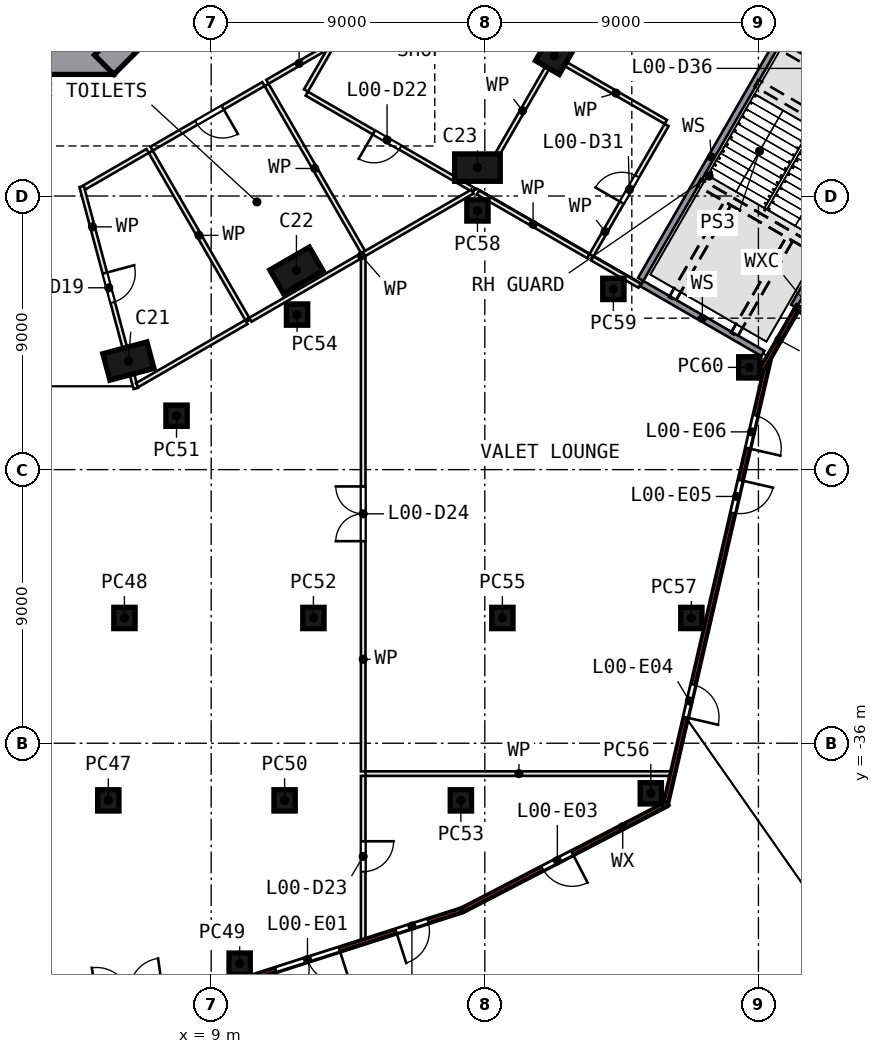
"""IFC4 building model, lengths in metres.
Left out: names, types, materials, properties, quantities, classifications, styles, units other than length and angle.
Written with IfcOpenShell. Run it as: python <this file> out.ifc"""

import sys

from ifc_helpers import new_model, si_unit, direction, frame, frame_2d, origin, origin_2d, place, context, subcontext, project, spatial, rectangle, extrude, element, fill, save


model = new_model("IFC4")
c1 = context("Model", 3, precision=1e-05, world=origin(), true_north=direction((0.0, 1.0)))
c2 = subcontext(c1, "Body", "Model", "MODEL_VIEW")
j1 = project(units=[si_unit("LENGTHUNIT", "METRE"), si_unit("PLANEANGLEUNIT", "RADIAN")], contexts=[c1])
p1 = place(None, origin())
s1 = spatial("IfcSite", under=j1, at=p1, CompositionType="ELEMENT")
p2 = place(p1, origin())
s2 = spatial("IfcBuilding", under=s1, at=p2, CompositionType="ELEMENT")
p3 = place(p2, origin())
s3 = spatial("IfcBuildingStorey", under=s2, at=p3, CompositionType="ELEMENT", Elevation=0.0)
for number, where, z_axis, x_axis in (
    (1, (6.278, -23.428, 0.0), (0.0, 0.0, 1.0), (-0.966, -0.259, 0.0)),
    (2, (11.804, -20.445, 0.0), (0.0, 0.0, 1.0), (0.866, 0.5, 0.0)),
    (3, (17.758, -17.065, 0.0), (0.0, 0.0, 1.0), (-1.0, 0.0, 0.0)),
):
    element("IfcColumn", number, at=place(p3, frame(where, z_axis=z_axis, x_axis=x_axis)), inside=s3, PredefinedType="COLUMN", context=c2, shape_type="SweptSolid", body=[
        extrude(rectangle(XDim=1.5, YDim=0.9, at=origin_2d()), origin(), (0.0, 0.0, 1.0), 7.55),
    ])
p4 = place(p3, frame((20.283, -13.385, 0.0), z_axis=(0.0, 0.0, 1.0), x_axis=(0.866025404, -0.5, 0.0)))
e4 = element("IfcColumn", 4, at=p4, inside=s3, PredefinedType="COLUMN", context=c2, shape_type="SweptSolid", body=[
    extrude(rectangle(XDim=0.9, YDim=0.9, at=origin_2d()), origin(), (0.0, 0.0, 1.0), 7.55),
])
p5 = place(p3, frame((-5.799, -13.55, 0.0), z_axis=(0.0, 0.0, 1.0), x_axis=(1.0, 0.0, 0.0)))
e5 = element("IfcWall", 5, at=p5, inside=s3, PredefinedType="SHEAR", context=c2, shape_type="SweptSolid", body=[
    extrude(rectangle(XDim=11.598, YDim=0.9, at=frame_2d((5.799, 0.0))), origin(), (0.0, 0.0, 1.0), 8.0),
])
p6 = place(p5, frame((4.899, 0.0, 0.0)))
e6 = element("IfcOpeningElement", 6, at=p6, cuts=e5, PredefinedType="OPENING", context=c2, shape_type="SweptSolid", body=[
    extrude(rectangle(XDim=1.8, YDim=2.1, at=frame_2d((0.9, 1.05))), frame((0.0, 0.46, 0.0), z_axis=(0.0, -1.0, 0.0), x_axis=(1.0, 0.0, 0.0)), (0.0, 0.0, 1.0), 0.92),
])
p7 = place(p3, frame((5.481, -13.682, 0.0), z_axis=(0.0, 0.0, 1.0), x_axis=(0.707106781, 0.707106781, 0.0)))
e7 = element("IfcWall", 7, at=p7, inside=s3, PredefinedType="SHEAR", context=c2, shape_type="SweptSolid", body=[
    extrude(rectangle(XDim=11.598, YDim=0.9, at=frame_2d((5.799, 0.0))), origin(), (0.0, 0.0, 1.0), 8.0),
])
p8 = place(p7, frame((2.099, 0.0, 0.0)))
e8 = element("IfcOpeningElement", 8, at=p8, cuts=e7, PredefinedType="OPENING", context=c2, shape_type="SweptSolid", body=[
    extrude(rectangle(XDim=1.2, YDim=2.1, at=frame_2d((0.6, 1.05))), frame((0.0, 0.46, 0.0), z_axis=(0.0, -1.0, 0.0), x_axis=(1.0, 0.0, 0.0)), (0.0, 0.0, 1.0), 0.92),
])
for number, where, z_axis, x_axis in (
    (9, (5.616, -37.88, 0.0), (0.0, 0.0, 1.0), (0.0, -1.0, 0.0)),
    (10, (6.147, -31.88, 0.0), (0.0, 0.0, 1.0), (0.0, -1.0, 0.0)),
    (11, (9.936, -43.251, 0.0), (0.0, 0.0, 1.0), (0.0, -1.0, 0.0)),
    (12, (11.415, -37.88, 0.0), (0.0, 0.0, 1.0), (0.0, -1.0, 0.0)),
    (13, (7.86, -25.227, 0.0), (0.0, 0.0, 1.0), (0.0, -1.0, 0.0)),
    (14, (12.363, -31.88, 0.0), (0.0, 0.0, 1.0), (0.0, -1.0, 0.0)),
    (15, (17.213, -37.88, 0.0), (0.0, 0.0, 1.0), (0.0, -1.0, 0.0)),
    (16, (11.825, -21.9, 0.0), (0.0, 0.0, 1.0), (0.0, -1.0, 0.0)),
    (17, (18.578, -31.88, 0.0), (0.0, 0.0, 1.0), (0.0, -1.0, 0.0)),
    (18, (23.46, -37.647, 0.0), (0.0, 0.0, 1.0), (0.0, -1.0, 0.0)),
    (19, (24.794, -31.88, 0.0), (0.0, 0.0, 1.0), (0.0, -1.0, 0.0)),
    (20, (17.758, -18.474, 0.0), (0.0, 0.0, 1.0), (0.0, -1.0, 0.0)),
    (21, (22.229, -21.055, 0.0), (0.0, 0.0, 1.0), (0.0, -1.0, 0.0)),
    (22, (26.7, -23.637, 0.0), (0.0, 0.0, 1.0), (0.0, -1.0, 0.0)),
):
    element("IfcColumn", number, at=place(p3, frame(where, z_axis=z_axis, x_axis=x_axis)), inside=s3, PredefinedType="COLUMN", context=c2, shape_type="SweptSolid", body=[
        extrude(rectangle(XDim=0.7, YDim=0.7, at=origin_2d()), origin(), (0.0, 0.0, 1.0), 8.0),
    ])
p9 = place(p3, frame((17.261, -41.482, 0.0), z_axis=(0.0, 0.0, 1.0), x_axis=(-0.952331204, -0.305066021, 0.0)))
e23 = element("IfcWall", 23, at=p9, inside=s3, PredefinedType="SOLIDWALL", context=c2, shape_type="SweptSolid", body=[
    extrude(rectangle(XDim=7.568, YDim=0.14, at=frame_2d((3.784, 0.0))), origin(), (0.0, 0.0, 1.0), 7.55),
])
p10 = place(p9, frame((4.248, 0.0, 0.0)))
e24 = element("IfcOpeningElement", 24, at=p10, cuts=e23, PredefinedType="OPENING", context=c2, shape_type="SweptSolid", body=[
    extrude(rectangle(XDim=2.2, YDim=2.4, at=frame_2d((1.1, 1.2))), frame((0.0, 0.08, 0.0), z_axis=(0.0, -1.0, 0.0), x_axis=(1.0, 0.0, 0.0)), (0.0, 0.0, 1.0), 0.16),
])
p11 = place(p9, frame((1.191, 0.0, 0.0)))
e25 = element("IfcOpeningElement", 25, at=p11, cuts=e23, PredefinedType="OPENING", context=c2, shape_type="SweptSolid", body=[
    extrude(rectangle(XDim=1.1, YDim=2.4, at=frame_2d((0.55, 1.2))), frame((0.0, 0.08, 0.0), z_axis=(0.0, -1.0, 0.0), x_axis=(1.0, 0.0, 0.0)), (0.0, 0.0, 1.0), 0.16),
])
p12 = place(p3, frame((24.021, -37.976, 0.0), z_axis=(0.0, 0.0, 1.0), x_axis=(-0.887749202, -0.460327442, 0.0)))
e26 = element("IfcWall", 26, at=p12, inside=s3, PredefinedType="SOLIDWALL", context=c2, shape_type="SweptSolid", body=[
    extrude(rectangle(XDim=7.627, YDim=0.14, at=frame_2d((3.813, 0.0))), origin(), (0.0, 0.0, 1.0), 7.55),
])
p13 = place(p12, frame((3.544, 0.0, 0.0)))
e27 = element("IfcOpeningElement", 27, at=p13, cuts=e26, PredefinedType="OPENING", context=c2, shape_type="SweptSolid", body=[
    extrude(rectangle(XDim=1.1, YDim=2.4, at=frame_2d((0.55, 1.2))), frame((0.0, 0.08, 0.0), z_axis=(0.0, -1.0, 0.0), x_axis=(1.0, 0.0, 0.0)), (0.0, 0.0, 1.0), 0.16),
])
p14 = place(p3, frame((27.288, -23.537, 0.0), z_axis=(0.0, 0.0, 1.0), x_axis=(-0.22528195, -0.974293612, 0.0)))
e28 = element("IfcWall", 28, at=p14, inside=s3, PredefinedType="SOLIDWALL", context=c2, shape_type="SweptSolid", body=[
    extrude(rectangle(XDim=14.772, YDim=0.14, at=frame_2d((7.386, 0.0))), origin(), (0.0, 0.0, 1.0), 7.55),
])
p15 = place(p14, frame((10.815, 0.0, 0.0)))
e29 = element("IfcOpeningElement", 29, at=p15, cuts=e28, PredefinedType="OPENING", context=c2, shape_type="SweptSolid", body=[
    extrude(rectangle(XDim=1.1, YDim=2.4, at=frame_2d((0.55, 1.2))), frame((0.0, 0.08, 0.0), z_axis=(0.0, -1.0, 0.0), x_axis=(1.0, 0.0, 0.0)), (0.0, 0.0, 1.0), 0.16),
])
p16 = place(p14, frame((3.91, 0.0, 0.0)))
e30 = element("IfcOpeningElement", 30, at=p16, cuts=e28, PredefinedType="OPENING", context=c2, shape_type="SweptSolid", body=[
    extrude(rectangle(XDim=1.1, YDim=2.4, at=frame_2d((0.55, 1.2))), frame((0.0, 0.08, 0.0), z_axis=(0.0, -1.0, 0.0), x_axis=(1.0, 0.0, 0.0)), (0.0, 0.0, 1.0), 0.16),
])
p17 = place(p14, frame((1.73, 0.0, 0.0)))
e31 = element("IfcOpeningElement", 31, at=p17, cuts=e28, PredefinedType="OPENING", context=c2, shape_type="SweptSolid", body=[
    extrude(rectangle(XDim=1.1, YDim=2.4, at=frame_2d((0.55, 1.2))), frame((0.0, 0.08, 0.0), z_axis=(0.0, -1.0, 0.0), x_axis=(1.0, 0.0, 0.0)), (0.0, 0.0, 1.0), 0.16),
])
p18 = place(p3, frame((27.101, -23.72, 0.0), z_axis=(0.0, 0.0, 1.0), x_axis=(0.499965247, 0.866045467, 0.0)))
e32 = element("IfcWall", 32, at=p18, inside=s3, PredefinedType="SOLIDWALL", context=c2, shape_type="SweptSolid", body=[
    extrude(rectangle(XDim=2.292, YDim=0.14, at=frame_2d((1.146, 0.0))), origin(), (0.0, 0.0, 1.0), 7.55),
])
p19 = place(p3, frame((28.221, -21.64, 0.0), z_axis=(0.0, 0.0, 1.0), x_axis=(0.866011627, -0.500023862, 0.0)))
e33 = element("IfcWall", 33, at=p19, inside=s3, PredefinedType="SOLIDWALL", context=c2, shape_type="SweptSolid", body=[
    extrude(rectangle(XDim=1.94, YDim=0.14, at=frame_2d((0.97, 0.0))), origin(), (0.0, 0.0, 1.0), 7.55),
])
p20 = place(p3, frame((4.739, -17.686, 0.0), z_axis=(0.0, 0.0, 1.0), x_axis=(0.258784572, -0.965935063, 0.0)))
e34 = element("IfcWall", 34, at=p20, inside=s3, PredefinedType="PARTITIONING", context=c2, shape_type="SweptSolid", body=[
    extrude(rectangle(XDim=6.879, YDim=0.15, at=frame_2d((3.44, 0.0))), origin(), (0.0, 0.0, 1.0), 7.55),
])
p21 = place(p20, frame((2.95, 0.0, 0.0)))
e35 = element("IfcOpeningElement", 35, at=p21, cuts=e34, PredefinedType="OPENING", context=c2, shape_type="SweptSolid", body=[
    extrude(rectangle(XDim=1.0, YDim=2.1, at=frame_2d((0.5, 1.05))), frame((0.0, 0.085, 0.0), z_axis=(0.0, -1.0, 0.0), x_axis=(1.0, 0.0, 0.0)), (0.0, 0.0, 1.0), 0.17),
])
p22 = place(p3, frame((6.565, -24.221, 0.0), z_axis=(0.0, 0.0, 1.0), x_axis=(0.866044525, 0.49996688, 0.0)))
e36 = element("IfcWall", 36, at=p22, inside=s3, PredefinedType="PARTITIONING", context=c2, shape_type="SweptSolid", body=[
    extrude(rectangle(XDim=4.15, YDim=0.15, at=frame_2d((2.075, 0.0))), origin(), (0.0, 0.0, 1.0), 7.55),
])
p23 = place(p3, frame((6.909, -16.517, 0.0), z_axis=(0.0, 0.0, 1.0), x_axis=(-0.866064057, -0.499933044, 0.0)))
e37 = element("IfcWall", 37, at=p23, inside=s3, PredefinedType="PARTITIONING", context=c2, shape_type="SweptSolid", body=[
    extrude(rectangle(XDim=2.408, YDim=0.15, at=frame_2d((1.204, 0.0))), origin(), (0.0, 0.0, 1.0), 7.55),
])
p24 = place(p3, frame((10.186, -22.043, 0.0), z_axis=(0.0, 0.0, 1.0), x_axis=(-0.499976504, 0.866038969, 0.0)))
e38 = element("IfcWall", 38, at=p24, inside=s3, PredefinedType="PARTITIONING", context=c2, shape_type="SweptSolid", body=[
    extrude(rectangle(XDim=6.35, YDim=0.15, at=frame_2d((3.175, 0.0))), origin(), (0.0, 0.0, 1.0), 7.55),
])
p25 = place(p3, frame((10.719, -14.317, 0.0), z_axis=(0.0, 0.0, 1.0), x_axis=(-0.866003829, -0.500037366, 0.0)))
e39 = element("IfcWall", 39, at=p25, inside=s3, PredefinedType="PARTITIONING", context=c2, shape_type="SweptSolid", body=[
    extrude(rectangle(XDim=4.25, YDim=0.15, at=frame_2d((2.125, 0.0))), origin(), (0.0, 0.0, 1.0), 7.55),
])
p26 = place(p25, frame((1.55, 0.0, 0.0)))
e40 = element("IfcOpeningElement", 40, at=p26, cuts=e39, PredefinedType="OPENING", context=c2, shape_type="SweptSolid", body=[
    extrude(rectangle(XDim=1.0, YDim=2.1, at=frame_2d((0.5, 1.05))), frame((0.0, 0.085, 0.0), z_axis=(0.0, -1.0, 0.0), x_axis=(1.0, 0.0, 0.0)), (0.0, 0.0, 1.0), 0.17),
])
p27 = place(p3, frame((17.643, -17.807, 0.0), z_axis=(0.0, 0.0, 1.0), x_axis=(-0.866029357, 0.499993152, 0.0)))
e41 = element("IfcWall", 41, at=p27, inside=s3, PredefinedType="PARTITIONING", context=c2, shape_type="SweptSolid", body=[
    extrude(rectangle(XDim=6.35, YDim=0.15, at=frame_2d((3.175, 0.0))), origin(), (0.0, 0.0, 1.0), 7.55),
])
p28 = place(p27, frame((2.8, 0.0, 0.0)))
e42 = element("IfcOpeningElement", 42, at=p28, cuts=e41, PredefinedType="OPENING", context=c2, shape_type="SweptSolid", body=[
    extrude(rectangle(XDim=1.0, YDim=2.1, at=frame_2d((0.5, 1.05))), frame((0.0, 0.085, 0.0), z_axis=(0.0, -1.0, 0.0), x_axis=(1.0, 0.0, 0.0)), (0.0, 0.0, 1.0), 0.17),
])
p29 = place(p3, frame((12.935, -13.038, 0.0), z_axis=(0.0, 0.0, 1.0), x_axis=(-0.866064057, -0.499933044, 0.0)))
e43 = element("IfcWall", 43, at=p29, inside=s3, PredefinedType="PARTITIONING", context=c2, shape_type="SweptSolid", body=[
    extrude(rectangle(XDim=2.408, YDim=0.15, at=frame_2d((1.204, 0.0))), origin(), (0.0, 0.0, 1.0), 7.55),
])
p30 = place(p3, frame((14.0, -37.075, 0.0), z_axis=(0.0, 0.0, 1.0), x_axis=(0.0, -1.0, 0.0)))
e44 = element("IfcWall", 44, at=p30, inside=s3, PredefinedType="PARTITIONING", context=c2, shape_type="SweptSolid", body=[
    extrude(rectangle(XDim=5.44, YDim=0.15, at=frame_2d((2.72, 0.0))), origin(), (0.0, 0.0, 1.0), 7.55),
])
p31 = place(p30, frame((2.15, 0.0, 0.0)))
e45 = element("IfcOpeningElement", 45, at=p31, cuts=e44, PredefinedType="OPENING", context=c2, shape_type="SweptSolid", body=[
    extrude(rectangle(XDim=1.0, YDim=2.1, at=frame_2d((0.5, 1.05))), frame((0.0, 0.085, 0.0), z_axis=(0.0, -1.0, 0.0), x_axis=(1.0, 0.0, 0.0)), (0.0, 0.0, 1.0), 0.17),
])
p32 = place(p3, frame((14.0, -36.925, 0.0), z_axis=(0.0, 0.0, 1.0), x_axis=(0.0, 1.0, 0.0)))
e46 = element("IfcWall", 46, at=p32, inside=s3, PredefinedType="PARTITIONING", context=c2, shape_type="SweptSolid", body=[
    extrude(rectangle(XDim=16.922, YDim=0.15, at=frame_2d((8.461, 0.0))), origin(), (0.0, 0.0, 1.0), 7.55),
])
p33 = place(p32, frame((7.572, 0.0, 0.0)))
e47 = element("IfcOpeningElement", 47, at=p33, cuts=e46, PredefinedType="OPENING", context=c2, shape_type="SweptSolid", body=[
    extrude(rectangle(XDim=1.8, YDim=2.1, at=frame_2d((0.9, 1.05))), frame((0.0, 0.085, 0.0), z_axis=(0.0, -1.0, 0.0), x_axis=(1.0, 0.0, 0.0)), (0.0, 0.0, 1.0), 0.17),
])
p34 = place(p3, frame((13.997, -19.843, 0.0), z_axis=(0.0, 0.0, 1.0), x_axis=(-0.499976504, 0.866038969, 0.0)))
e48 = element("IfcWall", 48, at=p34, inside=s3, PredefinedType="PARTITIONING", context=c2, shape_type="SweptSolid", body=[
    extrude(rectangle(XDim=6.35, YDim=0.15, at=frame_2d((3.175, 0.0))), origin(), (0.0, 0.0, 1.0), 7.55),
])
p35 = place(p3, frame((14.592, -10.243, 0.0), z_axis=(0.0, 0.0, 1.0), x_axis=(-0.500011342, -0.866018855, 0.0)))
e49 = element("IfcWall", 49, at=p35, inside=s3, PredefinedType="PARTITIONING", context=c2, shape_type="SweptSolid", body=[
    extrude(rectangle(XDim=4.95, YDim=0.15, at=frame_2d((2.475, 0.0))), origin(), (0.0, 0.0, 1.0), 7.55),
])
p36 = place(p3, frame((20.674, -13.668, 0.0), z_axis=(0.0, 0.0, 1.0), x_axis=(0.866024533, -0.500001508, 0.0)))
e50 = element("IfcWall", 50, at=p36, inside=s3, PredefinedType="PARTITIONING", context=c2, shape_type="SweptSolid", body=[
    extrude(rectangle(XDim=3.787, YDim=0.15, at=frame_2d((1.893, 0.0))), origin(), (0.0, 0.0, 1.0), 7.55),
])
p37 = place(p3, frame((17.593, -17.854, 0.0), z_axis=(0.0, 0.0, 1.0), x_axis=(-0.866022179, -0.500005586, 0.0)))
e51 = element("IfcWall", 51, at=p37, inside=s3, PredefinedType="PARTITIONING", context=c2, shape_type="SweptSolid", body=[
    extrude(rectangle(XDim=8.435, YDim=0.15, at=frame_2d((4.217, 0.0))), origin(), (0.0, 0.0, 1.0), 7.55),
])
p38 = place(p3, frame((18.436, -16.585, 0.0), z_axis=(0.0, 0.0, 1.0), x_axis=(0.49995248, 0.866052838, 0.0)))
e52 = element("IfcWall", 52, at=p38, inside=s3, PredefinedType="PARTITIONING", context=c2, shape_type="SweptSolid", body=[
    extrude(rectangle(XDim=3.216, YDim=0.15, at=frame_2d((1.608, 0.0))), origin(), (0.0, 0.0, 1.0), 7.55),
])
p39 = place(p3, frame((17.773, -17.882, 0.0), z_axis=(0.0, 0.0, 1.0), x_axis=(0.866005191, -0.500035008, 0.0)))
e53 = element("IfcWall", 53, at=p39, inside=s3, PredefinedType="PARTITIONING", context=c2, shape_type="SweptSolid", body=[
    extrude(rectangle(XDim=4.192, YDim=0.15, at=frame_2d((2.096, 0.0))), origin(), (0.0, 0.0, 1.0), 7.55),
])
p40 = place(p3, frame((21.533, -20.053, 0.0), z_axis=(0.0, 0.0, 1.0), x_axis=(0.865989076, -0.500062917, 0.0)))
e54 = element("IfcWall", 54, at=p40, inside=s3, PredefinedType="PARTITIONING", context=c2, shape_type="SweptSolid", body=[
    extrude(rectangle(XDim=1.8, YDim=0.15, at=frame_2d((0.9, 0.0))), origin(), (0.0, 0.0, 1.0), 7.55),
])
p41 = place(p3, frame((23.164, -20.879, 0.0), z_axis=(0.0, 0.0, 1.0), x_axis=(0.866030039, -0.499991972, 0.0)))
e55 = element("IfcWall", 55, at=p41, inside=s3, PredefinedType="SOLIDWALL", context=c2, shape_type="SweptSolid", body=[
    extrude(rectangle(XDim=4.6, YDim=0.2, at=frame_2d((2.3, 0.0))), origin(), (0.0, 0.0, 1.0), 7.55),
])
p42 = place(p3, frame((21.506, -19.951, 0.0), z_axis=(0.0, 0.0, 1.0), x_axis=(0.499995708, 0.866027882, 0.0)))
e56 = element("IfcWall", 56, at=p42, inside=s3, PredefinedType="PARTITIONING", context=c2, shape_type="SweptSolid", body=[
    extrude(rectangle(XDim=4.95, YDim=0.15, at=frame_2d((2.475, 0.0))), origin(), (0.0, 0.0, 1.0), 7.55),
])
p43 = place(p42, frame((2.0, 0.0, 0.0)))
e57 = element("IfcOpeningElement", 57, at=p43, cuts=e56, PredefinedType="OPENING", context=c2, shape_type="SweptSolid", body=[
    extrude(rectangle(XDim=1.0, YDim=2.1, at=frame_2d((0.5, 1.05))), frame((0.0, 0.085, 0.0), z_axis=(0.0, -1.0, 0.0), x_axis=(1.0, 0.0, 0.0)), (0.0, 0.0, 1.0), 0.17),
])
p44 = place(p3, frame((24.171, -37.0, 0.0), z_axis=(0.0, 0.0, 1.0), x_axis=(-1.0, 0.0, 0.0)))
e58 = element("IfcWall", 58, at=p44, inside=s3, PredefinedType="PARTITIONING", context=c2, shape_type="SweptSolid", body=[
    extrude(rectangle(XDim=10.096, YDim=0.15, at=frame_2d((5.048, 0.0))), origin(), (0.0, 0.0, 1.0), 7.55),
])
p45 = place(p3, frame((28.162, -21.623, 0.0), z_axis=(0.0, 0.0, 1.0), x_axis=(0.499981072, 0.866036332, 0.0)))
e59 = element("IfcWall", 59, at=p45, inside=s3, PredefinedType="SOLIDWALL", context=c2, shape_type="SweptSolid", body=[
    extrude(rectangle(XDim=7.545, YDim=0.2, at=frame_2d((3.772, 0.0))), origin(), (0.0, 0.0, 1.0), 7.55),
])
p46 = place(p3, frame((27.777, -12.688, 0.0), z_axis=(0.0, 0.0, 1.0), x_axis=(-0.500004225, -0.866022964, 0.0)))
e60 = element("IfcWall", 60, at=p46, inside=s3, PredefinedType="SOLIDWALL", context=c2, shape_type="SweptSolid", body=[
    extrude(rectangle(XDim=9.3, YDim=0.2, at=frame_2d((4.65, 0.0))), origin(), (0.0, 0.0, 1.0), 7.55),
])
p47 = place(p3, frame((27.914, -12.652, 0.0), z_axis=(0.0, 0.0, 1.0), x_axis=(0.86601677, -0.500014953, 0.0)))
e61 = element("IfcWall", 61, at=p47, inside=s3, PredefinedType="SOLIDWALL", context=c2, shape_type="SweptSolid", body=[
    extrude(rectangle(XDim=4.6, YDim=0.2, at=frame_2d((2.3, 0.0))), origin(), (0.0, 0.0, 1.0), 7.55),
])
p48 = place(p47, frame((1.75, 0.0, 0.0)))
e62 = element("IfcOpeningElement", 62, at=p48, cuts=e61, PredefinedType="OPENING", context=c2, shape_type="SweptSolid", body=[
    extrude(rectangle(XDim=1.1, YDim=2.1, at=frame_2d((0.55, 1.05))), frame((0.0, 0.11, 0.0), z_axis=(0.0, -1.0, 0.0), x_axis=(1.0, 0.0, 0.0)), (0.0, 0.0, 1.0), 0.22),
])
p49 = place(p10, origin())
e63 = element("IfcDoor", 63, at=p49, inside=s3, OperationType="DOUBLE_DOOR_SINGLE_SWING", PredefinedType="DOOR", context=c2, shape_type="SweptSolid", body=[
    extrude(rectangle(XDim=2.2, YDim=2.4, at=frame_2d((1.1, 1.2))), frame((0.0, 0.025, 0.0), z_axis=(0.0, -1.0, 0.0), x_axis=(1.0, 0.0, 0.0)), (0.0, 0.0, 1.0), 0.05),
])
fill(e24, e63)
p50 = place(p11, origin())
e64 = element("IfcDoor", 64, at=p50, inside=s3, OperationType="SINGLE_SWING_RIGHT", PredefinedType="DOOR", context=c2, shape_type="SweptSolid", body=[
    extrude(rectangle(XDim=1.1, YDim=2.4, at=frame_2d((0.55, 1.2))), frame((0.0, 0.025, 0.0), z_axis=(0.0, -1.0, 0.0), x_axis=(1.0, 0.0, 0.0)), (0.0, 0.0, 1.0), 0.05),
])
fill(e25, e64)
p51 = place(p13, origin())
e65 = element("IfcDoor", 65, at=p51, inside=s3, OperationType="SINGLE_SWING_LEFT", PredefinedType="DOOR", context=c2, shape_type="SweptSolid", body=[
    extrude(rectangle(XDim=1.1, YDim=2.4, at=frame_2d((0.55, 1.2))), frame((0.0, 0.025, 0.0), z_axis=(0.0, -1.0, 0.0), x_axis=(1.0, 0.0, 0.0)), (0.0, 0.0, 1.0), 0.05),
])
fill(e27, e65)
p52 = place(p15, origin())
e66 = element("IfcDoor", 66, at=p52, inside=s3, OperationType="SINGLE_SWING_RIGHT", PredefinedType="DOOR", context=c2, shape_type="SweptSolid", body=[
    extrude(rectangle(XDim=1.1, YDim=2.4, at=frame_2d((0.55, 1.2))), frame((0.0, 0.025, 0.0), z_axis=(0.0, -1.0, 0.0), x_axis=(1.0, 0.0, 0.0)), (0.0, 0.0, 1.0), 0.05),
])
fill(e29, e66)
p53 = place(p16, origin())
e67 = element("IfcDoor", 67, at=p53, inside=s3, OperationType="SINGLE_SWING_LEFT", PredefinedType="DOOR", context=c2, shape_type="SweptSolid", body=[
    extrude(rectangle(XDim=1.1, YDim=2.4, at=frame_2d((0.55, 1.2))), frame((0.0, 0.025, 0.0), z_axis=(0.0, -1.0, 0.0), x_axis=(1.0, 0.0, 0.0)), (0.0, 0.0, 1.0), 0.05),
])
fill(e30, e67)
p54 = place(p17, origin())
e68 = element("IfcDoor", 68, at=p54, inside=s3, OperationType="SINGLE_SWING_RIGHT", PredefinedType="DOOR", context=c2, shape_type="SweptSolid", body=[
    extrude(rectangle(XDim=1.1, YDim=2.4, at=frame_2d((0.55, 1.2))), frame((0.0, 0.025, 0.0), z_axis=(0.0, -1.0, 0.0), x_axis=(1.0, 0.0, 0.0)), (0.0, 0.0, 1.0), 0.05),
])
fill(e31, e68)
p55 = place(p21, origin())
e69 = element("IfcDoor", 69, at=p55, inside=s3, OperationType="SINGLE_SWING_LEFT", PredefinedType="DOOR", context=c2, shape_type="SweptSolid", body=[
    extrude(rectangle(XDim=1.0, YDim=2.1, at=frame_2d((0.5, 1.05))), frame((0.0, 0.025, 0.0), z_axis=(0.0, -1.0, 0.0), x_axis=(1.0, 0.0, 0.0)), (0.0, 0.0, 1.0), 0.05),
])
fill(e35, e69)
p56 = place(p26, origin())
e70 = element("IfcDoor", 70, at=p56, inside=s3, OperationType="SINGLE_SWING_LEFT", PredefinedType="DOOR", context=c2, shape_type="SweptSolid", body=[
    extrude(rectangle(XDim=1.0, YDim=2.1, at=frame_2d((0.5, 1.05))), frame((0.0, 0.025, 0.0), z_axis=(0.0, -1.0, 0.0), x_axis=(1.0, 0.0, 0.0)), (0.0, 0.0, 1.0), 0.05),
])
fill(e40, e70)
p57 = place(p28, origin())
e71 = element("IfcDoor", 71, at=p57, inside=s3, OperationType="SINGLE_SWING_RIGHT", PredefinedType="DOOR", context=c2, shape_type="SweptSolid", body=[
    extrude(rectangle(XDim=1.0, YDim=2.1, at=frame_2d((0.5, 1.05))), frame((0.0, 0.025, 0.0), z_axis=(0.0, -1.0, 0.0), x_axis=(1.0, 0.0, 0.0)), (0.0, 0.0, 1.0), 0.05),
])
fill(e42, e71)
p58 = place(p31, origin())
e72 = element("IfcDoor", 72, at=p58, inside=s3, OperationType="SINGLE_SWING_LEFT", PredefinedType="DOOR", context=c2, shape_type="SweptSolid", body=[
    extrude(rectangle(XDim=1.0, YDim=2.1, at=frame_2d((0.5, 1.05))), frame((0.0, 0.025, 0.0), z_axis=(0.0, -1.0, 0.0), x_axis=(1.0, 0.0, 0.0)), (0.0, 0.0, 1.0), 0.05),
])
fill(e45, e72)
p59 = place(p33, origin())
e73 = element("IfcDoor", 73, at=p59, inside=s3, OperationType="DOUBLE_DOOR_SINGLE_SWING", PredefinedType="DOOR", context=c2, shape_type="SweptSolid", body=[
    extrude(rectangle(XDim=1.8, YDim=2.1, at=frame_2d((0.9, 1.05))), frame((0.0, 0.025, 0.0), z_axis=(0.0, -1.0, 0.0), x_axis=(1.0, 0.0, 0.0)), (0.0, 0.0, 1.0), 0.05),
])
fill(e47, e73)
p60 = place(p43, origin())
e74 = element("IfcDoor", 74, at=p60, inside=s3, OperationType="SINGLE_SWING_LEFT", PredefinedType="DOOR", context=c2, shape_type="SweptSolid", body=[
    extrude(rectangle(XDim=1.0, YDim=2.1, at=frame_2d((0.5, 1.05))), frame((0.0, 0.025, 0.0), z_axis=(0.0, -1.0, 0.0), x_axis=(1.0, 0.0, 0.0)), (0.0, 0.0, 1.0), 0.05),
])
fill(e57, e74)
save(model, sys.argv[1])
